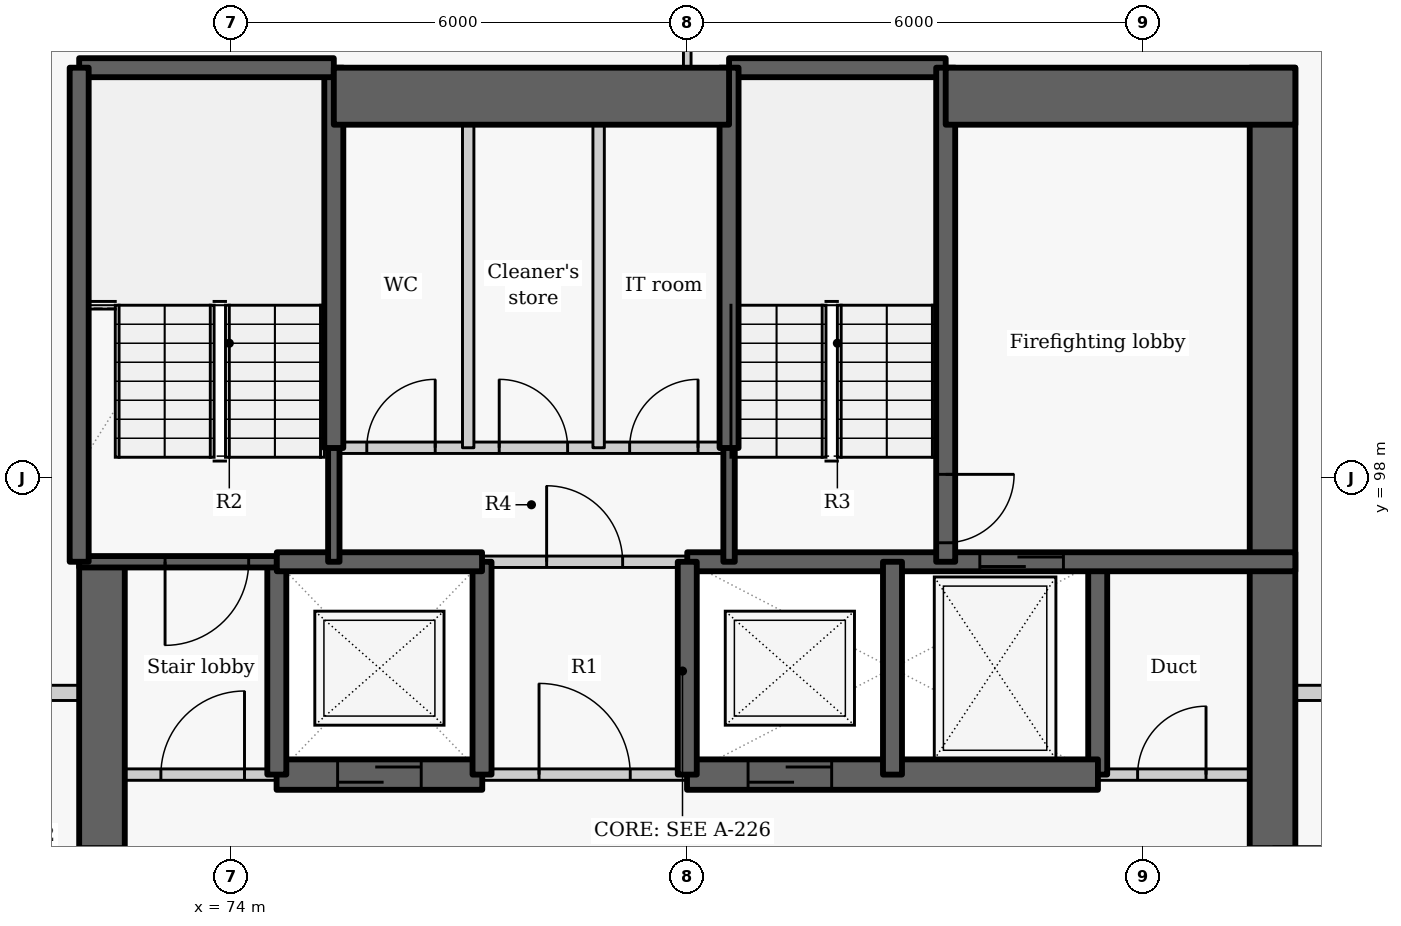
"""IFC4 building model, lengths in metres.
Left out: names, types, materials, properties, quantities, classifications, styles, units other than length and angle.
Written with IfcOpenShell. Run it as: python <this file> out.ifc"""

import sys

from ifc_helpers import new_model, si_unit, direction, frame, frame_2d, origin, place, context, subcontext, project, spatial, rectangle, extrude, element, fill, save


model = new_model("IFC4")
c1 = context("Model", 3, precision=1e-05, world=origin(), true_north=direction((0.0, 1.0)))
c2 = subcontext(c1, "Body", "Model", "MODEL_VIEW")
j1 = project(units=[si_unit("LENGTHUNIT", "METRE"), si_unit("PLANEANGLEUNIT", "RADIAN")], contexts=[c1])
p1 = place(None, origin())
s1 = spatial("IfcSite", under=j1, at=p1, CompositionType="ELEMENT")
p2 = place(p1, origin())
s2 = spatial("IfcBuilding", under=s1, at=p2, CompositionType="ELEMENT")
p3 = place(p2, frame((0.0, 0.0, 140.4)))
s3 = spatial("IfcBuildingStorey", under=s2, at=p3, CompositionType="ELEMENT", Elevation=140.4)
p4 = place(p3, frame((72.3, 87.8, -0.275), z_axis=(0.0, 0.0, 1.0), x_axis=(0.0, 1.0, 0.0)))
e1 = element("IfcWall", 1, at=p4, inside=s3, PredefinedType="SHEAR", context=c2, shape_type="SweptSolid", body=[
    extrude(rectangle(XDim=9.1, YDim=0.6, at=frame_2d((4.55, 0.0))), origin(), (0.0, 0.0, 1.0), 3.3),
])
p5 = place(p4, frame((3.852, 0.0, 0.275)))
e2 = element("IfcOpeningElement", 2, at=p5, cuts=e1, PredefinedType="OPENING", context=c2, shape_type="SweptSolid", body=[
    extrude(rectangle(XDim=1.5, YDim=2.1, at=frame_2d((0.75, 1.05))), frame((0.0, 0.31, 0.0), z_axis=(0.0, -1.0, 0.0), x_axis=(1.0, 0.0, 0.0)), (0.0, 0.0, 1.0), 0.62),
])
p6 = place(p3, frame((85.4, 94.1, -0.275), z_axis=(0.0, 0.0, 1.0), x_axis=(0.0, 1.0, 0.0)))
e3 = element("IfcWall", 3, at=p6, inside=s3, PredefinedType="SHEAR", context=c2, shape_type="SweptSolid", body=[
    extrude(rectangle(XDim=2.8, YDim=0.25, at=frame_2d((1.4, 0.0))), origin(), (0.0, 0.0, 1.0), 3.3),
])
p7 = place(p3, frame((87.7, 103.4, -0.275), z_axis=(0.0, 0.0, 1.0), x_axis=(0.0, -1.0, 0.0)))
e4 = element("IfcWall", 4, at=p7, inside=s3, PredefinedType="SHEAR", context=c2, shape_type="SweptSolid", body=[
    extrude(rectangle(XDim=15.6, YDim=0.6, at=frame_2d((7.8, 0.0))), origin(), (0.0, 0.0, 1.0), 3.3),
])
p8 = place(p7, frame((10.248, 0.0, 0.275)))
e5 = element("IfcOpeningElement", 5, at=p8, cuts=e4, PredefinedType="OPENING", context=c2, shape_type="SweptSolid", body=[
    extrude(rectangle(XDim=1.5, YDim=2.1, at=frame_2d((0.75, 1.05))), frame((0.0, 0.31, 0.0), z_axis=(0.0, -1.0, 0.0), x_axis=(1.0, 0.0, 0.0)), (0.0, 0.0, 1.0), 0.62),
])
p9 = place(p3, frame((72.0, 94.1, 0.0), z_axis=(0.0, 0.0, 1.0), x_axis=(1.0, 0.0, 0.0)))
e6 = element("IfcWall", 6, at=p9, inside=s3, PredefinedType="PARTITIONING", context=c2, shape_type="SweptSolid", body=[
    extrude(rectangle(XDim=2.603, YDim=0.15, at=frame_2d((1.302, 0.0))), origin(), (0.0, 0.0, 1.0), 3.025),
])
p10 = place(p9, frame((1.075, 0.0, 0.0)))
e7 = element("IfcOpeningElement", 7, at=p10, cuts=e6, PredefinedType="OPENING", context=c2, shape_type="SweptSolid", body=[
    extrude(rectangle(XDim=1.1, YDim=2.1, at=frame_2d((0.55, 1.05))), frame((0.0, 0.085, 0.0), z_axis=(0.0, -1.0, 0.0), x_axis=(1.0, 0.0, 0.0)), (0.0, 0.0, 1.0), 0.17),
])
p11 = place(p3, frame((77.297, 94.1, 0.0), z_axis=(0.0, 0.0, 1.0), x_axis=(1.0, 0.0, 0.0)))
e8 = element("IfcWall", 8, at=p11, inside=s3, PredefinedType="PARTITIONING", context=c2, shape_type="SweptSolid", body=[
    extrude(rectangle(XDim=2.706, YDim=0.15, at=frame_2d((1.353, 0.0))), origin(), (0.0, 0.0, 1.0), 3.025),
])
p12 = place(p11, frame((0.753, 0.0, 0.0)))
e9 = element("IfcOpeningElement", 9, at=p12, cuts=e8, PredefinedType="OPENING", context=c2, shape_type="SweptSolid", body=[
    extrude(rectangle(XDim=1.2, YDim=2.1, at=frame_2d((0.6, 1.05))), frame((0.0, 0.085, 0.0), z_axis=(0.0, -1.0, 0.0), x_axis=(1.0, 0.0, 0.0)), (0.0, 0.0, 1.0), 0.17),
])
p13 = place(p3, frame((85.397, 94.1, 0.0), z_axis=(0.0, 0.0, 1.0), x_axis=(1.0, 0.0, 0.0)))
e10 = element("IfcWall", 10, at=p13, inside=s3, PredefinedType="PARTITIONING", context=c2, shape_type="SweptSolid", body=[
    extrude(rectangle(XDim=2.603, YDim=0.15, at=frame_2d((1.302, 0.0))), origin(), (0.0, 0.0, 1.0), 3.025),
])
p14 = place(p13, frame((0.528, 0.0, 0.0)))
e11 = element("IfcOpeningElement", 11, at=p14, cuts=e10, PredefinedType="OPENING", context=c2, shape_type="SweptSolid", body=[
    extrude(rectangle(XDim=0.9, YDim=2.1, at=frame_2d((0.45, 1.05))), frame((0.0, 0.085, 0.0), z_axis=(0.0, -1.0, 0.0), x_axis=(1.0, 0.0, 0.0)), (0.0, 0.0, 1.0), 0.17),
])
p15 = place(p3, frame((74.597, 94.1, -0.275), z_axis=(0.0, 0.0, 1.0), x_axis=(1.0, 0.0, 0.0)))
e12 = element("IfcWall", 12, at=p15, inside=s3, PredefinedType="SHEAR", context=c2, shape_type="SweptSolid", body=[
    extrude(rectangle(XDim=2.706, YDim=0.4, at=frame_2d((1.353, 0.0))), origin(), (0.0, 0.0, 1.0), 3.3),
])
p16 = place(p15, frame((0.803, 0.0, 0.275)))
e13 = element("IfcOpeningElement", 13, at=p16, cuts=e12, PredefinedType="OPENING", context=c2, shape_type="SweptSolid", body=[
    extrude(rectangle(XDim=1.1, YDim=2.1, at=frame_2d((0.55, 1.05))), frame((0.0, 0.21, 0.0), z_axis=(0.0, -1.0, 0.0), x_axis=(1.0, 0.0, 0.0)), (0.0, 0.0, 1.0), 0.42),
])
p17 = place(p3, frame((79.997, 94.1, -0.275), z_axis=(0.0, 0.0, 1.0), x_axis=(1.0, 0.0, 0.0)))
e14 = element("IfcWall", 14, at=p17, inside=s3, PredefinedType="SHEAR", context=c2, shape_type="SweptSolid", body=[
    extrude(rectangle(XDim=5.406, YDim=0.4, at=frame_2d((2.703, 0.0))), origin(), (0.0, 0.0, 1.0), 3.3),
])
p18 = place(p17, frame((0.803, 0.0, 0.275)))
e15 = element("IfcOpeningElement", 15, at=p18, cuts=e14, PredefinedType="OPENING", context=c2, shape_type="SweptSolid", body=[
    extrude(rectangle(XDim=1.1, YDim=2.1, at=frame_2d((0.55, 1.05))), frame((0.0, 0.21, 0.0), z_axis=(0.0, -1.0, 0.0), x_axis=(1.0, 0.0, 0.0)), (0.0, 0.0, 1.0), 0.42),
])
p19 = place(p3, frame((74.6, 94.1, -0.275), z_axis=(0.0, 0.0, 1.0), x_axis=(0.0, 1.0, 0.0)))
e16 = element("IfcWall", 16, at=p19, inside=s3, PredefinedType="SHEAR", context=c2, shape_type="SweptSolid", body=[
    extrude(rectangle(XDim=2.8, YDim=0.25, at=frame_2d((1.4, 0.0))), origin(), (0.0, 0.0, 1.0), 3.3),
])
p20 = place(p3, frame((74.6, 96.9, -0.275), z_axis=(0.0, 0.0, 1.0), x_axis=(-1.0, 0.0, 0.0)))
e17 = element("IfcWall", 17, at=p20, inside=s3, PredefinedType="SHEAR", context=c2, shape_type="SweptSolid", body=[
    extrude(rectangle(XDim=2.6, YDim=0.15, at=frame_2d((1.3, 0.0))), origin(), (0.0, 0.0, 1.0), 3.3),
])
p21 = place(p20, frame((0.37, 0.0, 0.275)))
e18 = element("IfcOpeningElement", 18, at=p21, cuts=e17, PredefinedType="OPENING", context=c2, shape_type="SweptSolid", body=[
    extrude(rectangle(XDim=1.1, YDim=2.1, at=frame_2d((0.55, 1.05))), frame((0.0, 0.085, 0.0), z_axis=(0.0, -1.0, 0.0), x_axis=(1.0, 0.0, 0.0)), (0.0, 0.0, 1.0), 0.17),
])
p22 = place(p3, frame((77.3, 94.1, -0.275), z_axis=(0.0, 0.0, 1.0), x_axis=(0.0, 1.0, 0.0)))
e19 = element("IfcWall", 19, at=p22, inside=s3, PredefinedType="SHEAR", context=c2, shape_type="SweptSolid", body=[
    extrude(rectangle(XDim=2.8, YDim=0.25, at=frame_2d((1.4, 0.0))), origin(), (0.0, 0.0, 1.0), 3.3),
])
p23 = place(p3, frame((74.6, 96.9, -0.275), z_axis=(0.0, 0.0, 1.0), x_axis=(1.0, 0.0, 0.0)))
e20 = element("IfcWall", 20, at=p23, inside=s3, PredefinedType="SHEAR", context=c2, shape_type="SweptSolid", body=[
    extrude(rectangle(XDim=2.7, YDim=0.25, at=frame_2d((1.35, 0.0))), origin(), (0.0, 0.0, 1.0), 3.3),
])
p24 = place(p3, frame((80.0, 96.9, -0.275), z_axis=(0.0, 0.0, 1.0), x_axis=(1.0, 0.0, 0.0)))
e21 = element("IfcWall", 21, at=p24, inside=s3, PredefinedType="SHEAR", context=c2, shape_type="SweptSolid", body=[
    extrude(rectangle(XDim=8.0, YDim=0.25, at=frame_2d((4.0, 0.0))), origin(), (0.0, 0.0, 1.0), 3.3),
])
p25 = place(p24, frame((3.849, 0.0, 0.275)))
e22 = element("IfcOpeningElement", 22, at=p25, cuts=e21, PredefinedType="OPENING", context=c2, shape_type="SweptSolid", body=[
    extrude(rectangle(XDim=1.1, YDim=2.1, at=frame_2d((0.55, 1.05))), frame((0.0, 0.135, 0.0), z_axis=(0.0, -1.0, 0.0), x_axis=(1.0, 0.0, 0.0)), (0.0, 0.0, 1.0), 0.27),
])
p26 = place(p3, frame((80.0, 94.1, -0.275), z_axis=(0.0, 0.0, 1.0), x_axis=(0.0, 1.0, 0.0)))
e23 = element("IfcWall", 23, at=p26, inside=s3, PredefinedType="SHEAR", context=c2, shape_type="SweptSolid", body=[
    extrude(rectangle(XDim=2.8, YDim=0.25, at=frame_2d((1.4, 0.0))), origin(), (0.0, 0.0, 1.0), 3.3),
])
p27 = place(p3, frame((77.3, 96.9, 0.0), z_axis=(0.0, 0.0, 1.0), x_axis=(1.0, 0.0, 0.0)))
e24 = element("IfcWall", 24, at=p27, inside=s3, PredefinedType="PARTITIONING", context=c2, shape_type="SweptSolid", body=[
    extrude(rectangle(XDim=2.7, YDim=0.15, at=frame_2d((1.35, 0.0))), origin(), (0.0, 0.0, 1.0), 3.025),
])
p28 = place(p27, frame((0.85, 0.0, 0.0)))
e25 = element("IfcOpeningElement", 25, at=p28, cuts=e24, PredefinedType="OPENING", context=c2, shape_type="SweptSolid", body=[
    extrude(rectangle(XDim=1.0, YDim=2.1, at=frame_2d((0.5, 1.05))), frame((0.0, 0.085, 0.0), z_axis=(0.0, -1.0, 0.0), x_axis=(1.0, 0.0, 0.0)), (0.0, 0.0, 1.0), 0.17),
])
p29 = place(p3, frame((82.7, 94.1, -0.275), z_axis=(0.0, 0.0, 1.0), x_axis=(0.0, 1.0, 0.0)))
e26 = element("IfcWall", 26, at=p29, inside=s3, PredefinedType="SHEAR", context=c2, shape_type="SweptSolid", body=[
    extrude(rectangle(XDim=2.8, YDim=0.25, at=frame_2d((1.4, 0.0))), origin(), (0.0, 0.0, 1.0), 3.3),
])
p30 = place(p3, frame((75.35, 96.9, -0.275), z_axis=(0.0, 0.0, 1.0), x_axis=(0.0, 1.0, 0.0)))
e27 = element("IfcWall", 27, at=p30, inside=s3, PredefinedType="SHEAR", context=c2, shape_type="SweptSolid", body=[
    extrude(rectangle(XDim=1.503, YDim=0.15, at=frame_2d((0.751, 0.0))), origin(), (0.0, 0.0, 1.0), 3.3),
])
p31 = place(p3, frame((75.35, 98.397, -0.275), z_axis=(0.0, 0.0, 1.0), x_axis=(0.0, 1.0, 0.0)))
e28 = element("IfcWall", 28, at=p31, inside=s3, PredefinedType="SHEAR", context=c2, shape_type="SweptSolid", body=[
    extrude(rectangle(XDim=5.003, YDim=0.25, at=frame_2d((2.501, 0.0))), origin(), (0.0, 0.0, 1.0), 3.3),
])
p32 = place(p3, frame((72.0, 103.4, -0.275), z_axis=(0.0, 0.0, 1.0), x_axis=(1.0, 0.0, 0.0)))
e29 = element("IfcWall", 29, at=p32, inside=s3, PredefinedType="SHEAR", context=c2, shape_type="SweptSolid", body=[
    extrude(rectangle(XDim=3.35, YDim=0.25, at=frame_2d((1.675, 0.0))), origin(), (0.0, 0.0, 1.0), 3.3),
])
p33 = place(p3, frame((80.55, 103.4, -0.275), z_axis=(0.0, 0.0, 1.0), x_axis=(1.0, 0.0, 0.0)))
e30 = element("IfcWall", 30, at=p33, inside=s3, PredefinedType="SHEAR", context=c2, shape_type="SweptSolid", body=[
    extrude(rectangle(XDim=2.85, YDim=0.25, at=frame_2d((1.425, 0.0))), origin(), (0.0, 0.0, 1.0), 3.3),
])
p34 = place(p3, frame((72.0, 96.9, -0.275), z_axis=(0.0, 0.0, 1.0), x_axis=(0.0, 1.0, 0.0)))
e31 = element("IfcWall", 31, at=p34, inside=s3, PredefinedType="SHEAR", context=c2, shape_type="SweptSolid", body=[
    extrude(rectangle(XDim=6.5, YDim=0.25, at=frame_2d((3.25, 0.0))), origin(), (0.0, 0.0, 1.0), 3.3),
])
p35 = place(p3, frame((83.4, 103.4, -0.275), z_axis=(0.0, 0.0, 1.0), x_axis=(0.0, -1.0, 0.0)))
e32 = element("IfcWall", 32, at=p35, inside=s3, PredefinedType="SHEAR", context=c2, shape_type="SweptSolid", body=[
    extrude(rectangle(XDim=6.5, YDim=0.25, at=frame_2d((3.25, 0.0))), origin(), (0.0, 0.0, 1.0), 3.3),
])
p36 = place(p35, frame((5.35, 0.0, 0.275)))
e33 = element("IfcOpeningElement", 33, at=p36, cuts=e32, PredefinedType="OPENING", context=c2, shape_type="SweptSolid", body=[
    extrude(rectangle(XDim=0.9, YDim=2.1, at=frame_2d((0.45, 1.05))), frame((0.0, 0.135, 0.0), z_axis=(0.0, -1.0, 0.0), x_axis=(1.0, 0.0, 0.0)), (0.0, 0.0, 1.0), 0.27),
])
p37 = place(p3, frame((80.55, 96.9, -0.275), z_axis=(0.0, 0.0, 1.0), x_axis=(0.0, 1.0, 0.0)))
e34 = element("IfcWall", 34, at=p37, inside=s3, PredefinedType="SHEAR", context=c2, shape_type="SweptSolid", body=[
    extrude(rectangle(XDim=1.503, YDim=0.15, at=frame_2d((0.751, 0.0))), origin(), (0.0, 0.0, 1.0), 3.3),
])
p38 = place(p3, frame((80.55, 98.397, -0.275), z_axis=(0.0, 0.0, 1.0), x_axis=(0.0, 1.0, 0.0)))
e35 = element("IfcWall", 35, at=p38, inside=s3, PredefinedType="SHEAR", context=c2, shape_type="SweptSolid", body=[
    extrude(rectangle(XDim=5.003, YDim=0.25, at=frame_2d((2.501, 0.0))), origin(), (0.0, 0.0, 1.0), 3.3),
])
p39 = place(p3, frame((75.35, 103.025, -0.275), z_axis=(0.0, 0.0, 1.0), x_axis=(1.0, 0.0, 0.0)))
e36 = element("IfcWall", 36, at=p39, inside=s3, PredefinedType="SHEAR", context=c2, shape_type="SweptSolid", body=[
    extrude(rectangle(XDim=5.2, YDim=0.75, at=frame_2d((2.6, 0.0))), origin(), (0.0, 0.0, 1.0), 3.3),
])
p40 = place(p3, frame((83.4, 103.025, -0.275), z_axis=(0.0, 0.0, 1.0), x_axis=(1.0, 0.0, 0.0)))
e37 = element("IfcWall", 37, at=p40, inside=s3, PredefinedType="SHEAR", context=c2, shape_type="SweptSolid", body=[
    extrude(rectangle(XDim=4.6, YDim=0.75, at=frame_2d((2.3, 0.0))), origin(), (0.0, 0.0, 1.0), 3.3),
])
p41 = place(p3, frame((75.35, 98.4, 0.0), z_axis=(0.0, 0.0, 1.0), x_axis=(1.0, 0.0, 0.0)))
e38 = element("IfcWall", 38, at=p41, inside=s3, PredefinedType="PARTITIONING", context=c2, shape_type="SweptSolid", body=[
    extrude(rectangle(XDim=5.2, YDim=0.15, at=frame_2d((2.6, 0.0))), origin(), (0.0, 0.0, 1.0), 3.025),
])
p42 = place(p41, frame((0.434, 0.0, 0.0)))
e39 = element("IfcOpeningElement", 39, at=p42, cuts=e38, PredefinedType="OPENING", context=c2, shape_type="SweptSolid", body=[
    extrude(rectangle(XDim=0.9, YDim=2.1, at=frame_2d((0.45, 1.05))), frame((0.0, 0.085, 0.0), z_axis=(0.0, -1.0, 0.0), x_axis=(1.0, 0.0, 0.0)), (0.0, 0.0, 1.0), 0.17),
])
p43 = place(p41, frame((2.176, 0.0, 0.0)))
e40 = element("IfcOpeningElement", 40, at=p43, cuts=e38, PredefinedType="OPENING", context=c2, shape_type="SweptSolid", body=[
    extrude(rectangle(XDim=0.9, YDim=2.1, at=frame_2d((0.45, 1.05))), frame((0.0, 0.085, 0.0), z_axis=(0.0, -1.0, 0.0), x_axis=(1.0, 0.0, 0.0)), (0.0, 0.0, 1.0), 0.17),
])
p44 = place(p41, frame((3.892, 0.0, 0.0)))
e41 = element("IfcOpeningElement", 41, at=p44, cuts=e38, PredefinedType="OPENING", context=c2, shape_type="SweptSolid", body=[
    extrude(rectangle(XDim=0.9, YDim=2.1, at=frame_2d((0.45, 1.05))), frame((0.0, 0.085, 0.0), z_axis=(0.0, -1.0, 0.0), x_axis=(1.0, 0.0, 0.0)), (0.0, 0.0, 1.0), 0.17),
])
for number, where, z_axis, x_axis in (
    (42, (77.118, 98.4, 0.0), (0.0, 0.0, 1.0), (0.0, 1.0, 0.0)),
    (43, (78.834, 98.4, 0.0), (0.0, 0.0, 1.0), (0.0, 1.0, 0.0)),
):
    element("IfcWall", number, at=place(p3, frame(where, z_axis=z_axis, x_axis=x_axis)), inside=s3, PredefinedType="PARTITIONING", context=c2, shape_type="SweptSolid", body=[
        extrude(rectangle(XDim=5.0, YDim=0.15, at=frame_2d((2.5, 0.0))), origin(), (0.0, 0.0, 1.0), 3.025),
    ])
p45 = place(p3, frame((69.537, 95.175, 0.0), z_axis=(0.0, 0.0, 1.0), x_axis=(1.0, 0.0, 0.0)))
e44 = element("IfcWall", 44, at=p45, inside=s3, PredefinedType="PARTITIONING", context=c2, shape_type="SweptSolid", body=[
    extrude(rectangle(XDim=2.463, YDim=0.2, at=frame_2d((1.231, 0.0))), origin(), (0.0, 0.0, 1.0), 2.505),
])
p46 = place(p3, frame((88.0, 95.175, 0.0), z_axis=(0.0, 0.0, 1.0), x_axis=(1.0, 0.0, 0.0)))
e45 = element("IfcWall", 45, at=p46, inside=s3, PredefinedType="PARTITIONING", context=c2, shape_type="SweptSolid", body=[
    extrude(rectangle(XDim=1.423, YDim=0.2, at=frame_2d((0.711, 0.0))), origin(), (0.0, 0.0, 1.0), 3.025),
])
p47 = place(p3, frame((80.0, 103.4, 0.0), z_axis=(0.0, 0.0, 1.0), x_axis=(0.0, 1.0, 0.0)))
e46 = element("IfcWall", 46, at=p47, inside=s3, PredefinedType="PARTITIONING", context=c2, shape_type="SweptSolid", body=[
    extrude(rectangle(XDim=0.3, YDim=0.1, at=frame_2d((0.15, 0.0))), origin(), (0.0, 0.0, 1.0), 3.025),
])
p48 = place(p10, origin())
e47 = element("IfcDoor", 47, at=p48, inside=s3, OperationType="SINGLE_SWING_RIGHT", PredefinedType="DOOR", context=c2, shape_type="SweptSolid", body=[
    extrude(rectangle(XDim=1.1, YDim=2.1, at=frame_2d((0.55, 1.05))), frame((0.0, 0.025, 0.0), z_axis=(0.0, -1.0, 0.0), x_axis=(1.0, 0.0, 0.0)), (0.0, 0.0, 1.0), 0.05),
])
fill(e7, e47)
p49 = place(p16, origin())
e48 = element("IfcDoor", 48, at=p49, inside=s3, OperationType="SLIDING_TO_LEFT", PredefinedType="DOOR", context=c2, shape_type="SweptSolid", body=[
    extrude(rectangle(XDim=1.1, YDim=2.1, at=frame_2d((0.55, 1.05))), frame((0.0, 0.025, 0.0), z_axis=(0.0, -1.0, 0.0), x_axis=(1.0, 0.0, 0.0)), (0.0, 0.0, 1.0), 0.05),
])
fill(e13, e48)
p50 = place(p12, origin())
e49 = element("IfcDoor", 49, at=p50, inside=s3, OperationType="DOUBLE_DOOR_SINGLE_SWING", PredefinedType="DOOR", context=c2, shape_type="SweptSolid", body=[
    extrude(rectangle(XDim=1.2, YDim=2.1, at=frame_2d((0.6, 1.05))), frame((0.0, 0.025, 0.0), z_axis=(0.0, -1.0, 0.0), x_axis=(1.0, 0.0, 0.0)), (0.0, 0.0, 1.0), 0.05),
])
fill(e9, e49)
p51 = place(p18, origin())
e50 = element("IfcDoor", 50, at=p51, inside=s3, OperationType="SLIDING_TO_LEFT", PredefinedType="DOOR", context=c2, shape_type="SweptSolid", body=[
    extrude(rectangle(XDim=1.1, YDim=2.1, at=frame_2d((0.55, 1.05))), frame((0.0, 0.025, 0.0), z_axis=(0.0, -1.0, 0.0), x_axis=(1.0, 0.0, 0.0)), (0.0, 0.0, 1.0), 0.05),
])
fill(e15, e50)
p52 = place(p25, origin())
e51 = element("IfcDoor", 51, at=p52, inside=s3, OperationType="SLIDING_TO_LEFT", PredefinedType="DOOR", context=c2, shape_type="SweptSolid", body=[
    extrude(rectangle(XDim=1.1, YDim=2.1, at=frame_2d((0.55, 1.05))), frame((0.0, 0.025, 0.0), z_axis=(0.0, -1.0, 0.0), x_axis=(1.0, 0.0, 0.0)), (0.0, 0.0, 1.0), 0.05),
])
fill(e22, e51)
p53 = place(p14, origin())
e52 = element("IfcDoor", 52, at=p53, inside=s3, OperationType="SINGLE_SWING_RIGHT", PredefinedType="DOOR", context=c2, shape_type="SweptSolid", body=[
    extrude(rectangle(XDim=0.9, YDim=2.1, at=frame_2d((0.45, 1.05))), frame((0.0, 0.025, 0.0), z_axis=(0.0, -1.0, 0.0), x_axis=(1.0, 0.0, 0.0)), (0.0, 0.0, 1.0), 0.05),
])
fill(e11, e52)
p54 = place(p28, origin())
e53 = element("IfcDoor", 53, at=p54, inside=s3, OperationType="SINGLE_SWING_LEFT", PredefinedType="DOOR", context=c2, shape_type="SweptSolid", body=[
    extrude(rectangle(XDim=1.0, YDim=2.1, at=frame_2d((0.5, 1.05))), frame((0.0, 0.025, 0.0), z_axis=(0.0, -1.0, 0.0), x_axis=(1.0, 0.0, 0.0)), (0.0, 0.0, 1.0), 0.05),
])
fill(e25, e53)
p55 = place(p42, origin())
e54 = element("IfcDoor", 54, at=p55, inside=s3, OperationType="SINGLE_SWING_RIGHT", PredefinedType="DOOR", context=c2, shape_type="SweptSolid", body=[
    extrude(rectangle(XDim=0.9, YDim=2.1, at=frame_2d((0.45, 1.05))), frame((0.0, 0.025, 0.0), z_axis=(0.0, -1.0, 0.0), x_axis=(1.0, 0.0, 0.0)), (0.0, 0.0, 1.0), 0.05),
])
fill(e39, e54)
p56 = place(p43, origin())
e55 = element("IfcDoor", 55, at=p56, inside=s3, OperationType="SINGLE_SWING_LEFT", PredefinedType="DOOR", context=c2, shape_type="SweptSolid", body=[
    extrude(rectangle(XDim=0.9, YDim=2.1, at=frame_2d((0.45, 1.05))), frame((0.0, 0.025, 0.0), z_axis=(0.0, -1.0, 0.0), x_axis=(1.0, 0.0, 0.0)), (0.0, 0.0, 1.0), 0.05),
])
fill(e40, e55)
p57 = place(p44, origin())
e56 = element("IfcDoor", 56, at=p57, inside=s3, OperationType="SINGLE_SWING_RIGHT", PredefinedType="DOOR", context=c2, shape_type="SweptSolid", body=[
    extrude(rectangle(XDim=0.9, YDim=2.1, at=frame_2d((0.45, 1.05))), frame((0.0, 0.025, 0.0), z_axis=(0.0, -1.0, 0.0), x_axis=(1.0, 0.0, 0.0)), (0.0, 0.0, 1.0), 0.05),
])
fill(e41, e56)
p58 = place(p21, origin())
e57 = element("IfcDoor", 57, at=p58, inside=s3, OperationType="SINGLE_SWING_RIGHT", PredefinedType="DOOR", context=c2, shape_type="SweptSolid", body=[
    extrude(rectangle(XDim=1.1, YDim=2.1, at=frame_2d((0.55, 1.05))), frame((0.0, 0.025, 0.0), z_axis=(0.0, -1.0, 0.0), x_axis=(1.0, 0.0, 0.0)), (0.0, 0.0, 1.0), 0.05),
])
fill(e18, e57)
p59 = place(p36, origin())
e58 = element("IfcDoor", 58, at=p59, inside=s3, OperationType="SINGLE_SWING_LEFT", PredefinedType="DOOR", context=c2, shape_type="SweptSolid", body=[
    extrude(rectangle(XDim=0.9, YDim=2.1, at=frame_2d((0.45, 1.05))), frame((0.0, 0.025, 0.0), z_axis=(0.0, -1.0, 0.0), x_axis=(1.0, 0.0, 0.0)), (0.0, 0.0, 1.0), 0.05),
])
fill(e33, e58)
p60 = place(p8, origin())
e59 = element("IfcDoor", 59, at=p60, inside=s3, OperationType="DOUBLE_DOOR_SINGLE_SWING", PredefinedType="DOOR", context=c2, shape_type="SweptSolid", body=[
    extrude(rectangle(XDim=1.5, YDim=2.1, at=frame_2d((0.75, 1.05))), frame((0.0, 0.025, 0.0), z_axis=(0.0, -1.0, 0.0), x_axis=(1.0, 0.0, 0.0)), (0.0, 0.0, 1.0), 0.05),
])
fill(e5, e59)
p61 = place(p5, origin())
e60 = element("IfcDoor", 60, at=p61, inside=s3, OperationType="DOUBLE_DOOR_SINGLE_SWING", PredefinedType="DOOR", context=c2, shape_type="SweptSolid", body=[
    extrude(rectangle(XDim=1.5, YDim=2.1, at=frame_2d((0.75, 1.05))), frame((0.0, 0.025, 0.0), z_axis=(0.0, -1.0, 0.0), x_axis=(1.0, 0.0, 0.0)), (0.0, 0.0, 1.0), 0.05),
])
fill(e2, e60)
save(model, sys.argv[1])
